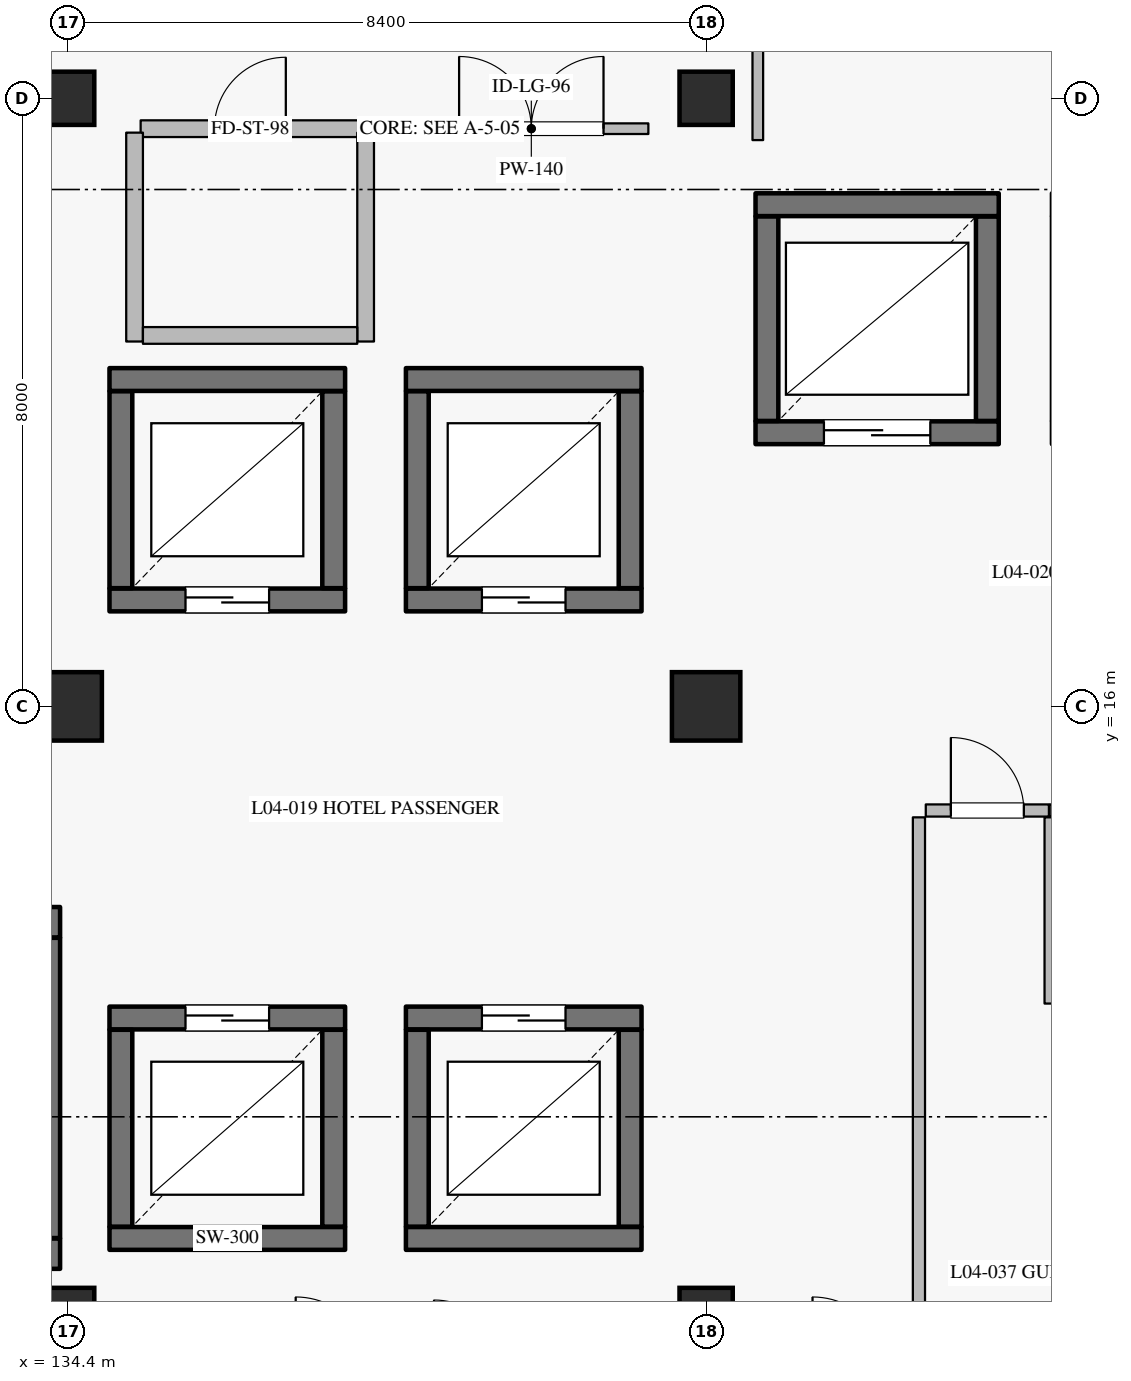
"""IFC4 building model, lengths in metres.
Left out: names, types, materials, properties, quantities, classifications, styles, units other than length and angle.
Written with IfcOpenShell. Run it as: python <this file> out.ifc"""

import sys

from ifc_helpers import new_model, si_unit, direction, frame, frame_2d, origin, origin_2d, place, context, subcontext, project, spatial, rectangle, extrude, element, fill, save


model = new_model("IFC4")
c1 = context("Model", 3, precision=1e-05, world=origin(), true_north=direction((0.0, 1.0)))
c2 = subcontext(c1, "Body", "Model", "MODEL_VIEW")
j1 = project(units=[si_unit("LENGTHUNIT", "METRE"), si_unit("PLANEANGLEUNIT", "RADIAN")], contexts=[c1])
p1 = place(None, origin())
s1 = spatial("IfcSite", under=j1, at=p1, CompositionType="ELEMENT")
p2 = place(p1, origin())
s2 = spatial("IfcBuilding", under=s1, at=p2, CompositionType="ELEMENT")
p3 = place(p2, frame((0.0, 0.0, 21.0)))
s3 = spatial("IfcBuildingStorey", under=s2, at=p3, CompositionType="ELEMENT", Elevation=21.0)
for number, where, z_axis, x_axis in (
    (1, (134.4, 16.0, 0.0), (0.0, 0.0, 1.0), (1.0, 0.0, 0.0)),
    (2, (142.8, 16.0, 0.0), (0.0, 0.0, 1.0), (1.0, 0.0, 0.0)),
):
    element("IfcColumn", number, at=place(p3, frame(where, z_axis=z_axis, x_axis=x_axis)), inside=s3, PredefinedType="COLUMN", context=c2, shape_type="SweptSolid", body=[
        extrude(rectangle(XDim=0.9, YDim=0.9, at=origin_2d()), origin(), (0.0, 0.0, 1.0), 4.2),
    ])
for number, where, z_axis, x_axis in (
    (3, (134.4, 8.0, 0.0), (0.0, 0.0, 1.0), (1.0, 0.0, 0.0)),
    (4, (134.4, 24.0, 0.0), (0.0, 0.0, 1.0), (1.0, 0.0, 0.0)),
    (5, (142.8, 8.0, 0.0), (0.0, 0.0, 1.0), (1.0, 0.0, 0.0)),
    (6, (142.8, 24.0, 0.0), (0.0, 0.0, 1.0), (1.0, 0.0, 0.0)),
):
    element("IfcColumn", number, at=place(p3, frame(where, z_axis=z_axis, x_axis=x_axis)), inside=s3, PredefinedType="COLUMN", context=c2, shape_type="SweptSolid", body=[
        extrude(rectangle(XDim=0.7, YDim=0.7, at=origin_2d()), origin(), (0.0, 0.0, 1.0), 4.2),
    ])
p4 = place(p3, frame((134.95, 17.4, 0.0), z_axis=(0.0, 0.0, 1.0), x_axis=(1.0, 0.0, 0.0)))
e7 = element("IfcWall", 7, at=p4, inside=s3, PredefinedType="SHEAR", context=c2, shape_type="SweptSolid", body=[
    extrude(rectangle(XDim=3.1, YDim=0.3, at=frame_2d((1.55, 0.0))), origin(), (0.0, 0.0, 1.0), 3.965),
])
p5 = place(p4, frame((1.0, 0.0, 0.0)))
e8 = element("IfcOpeningElement", 8, at=p5, cuts=e7, PredefinedType="OPENING", context=c2, shape_type="SweptSolid", body=[
    extrude(rectangle(XDim=1.1, YDim=2.2, at=frame_2d((0.55, 1.1))), frame((0.0, 0.16, 0.0), z_axis=(0.0, -1.0, 0.0), x_axis=(1.0, 0.0, 0.0)), (0.0, 0.0, 1.0), 0.32),
])
p6 = place(p3, frame((137.9, 17.555, 0.0), z_axis=(0.0, 0.0, 1.0), x_axis=(0.0, 1.0, 0.0)))
e9 = element("IfcWall", 9, at=p6, inside=s3, PredefinedType="SHEAR", context=c2, shape_type="SweptSolid", body=[
    extrude(rectangle(XDim=2.59, YDim=0.3, at=frame_2d((1.295, 0.0))), origin(), (0.0, 0.0, 1.0), 3.965),
])
p7 = place(p3, frame((138.05, 20.3, 0.0), z_axis=(0.0, 0.0, 1.0), x_axis=(-1.0, 0.0, 0.0)))
e10 = element("IfcWall", 10, at=p7, inside=s3, PredefinedType="SHEAR", context=c2, shape_type="SweptSolid", body=[
    extrude(rectangle(XDim=3.1, YDim=0.3, at=frame_2d((1.55, 0.0))), origin(), (0.0, 0.0, 1.0), 3.965),
])
p8 = place(p3, frame((135.1, 20.145, 0.0), z_axis=(0.0, 0.0, 1.0), x_axis=(0.0, -1.0, 0.0)))
e11 = element("IfcWall", 11, at=p8, inside=s3, PredefinedType="SHEAR", context=c2, shape_type="SweptSolid", body=[
    extrude(rectangle(XDim=2.59, YDim=0.3, at=frame_2d((1.295, 0.0))), origin(), (0.0, 0.0, 1.0), 3.965),
])
p9 = place(p3, frame((138.85, 17.4, 0.0), z_axis=(0.0, 0.0, 1.0), x_axis=(1.0, 0.0, 0.0)))
e12 = element("IfcWall", 12, at=p9, inside=s3, PredefinedType="SHEAR", context=c2, shape_type="SweptSolid", body=[
    extrude(rectangle(XDim=3.1, YDim=0.3, at=frame_2d((1.55, 0.0))), origin(), (0.0, 0.0, 1.0), 3.965),
])
p10 = place(p9, frame((1.0, 0.0, 0.0)))
e13 = element("IfcOpeningElement", 13, at=p10, cuts=e12, PredefinedType="OPENING", context=c2, shape_type="SweptSolid", body=[
    extrude(rectangle(XDim=1.1, YDim=2.2, at=frame_2d((0.55, 1.1))), frame((0.0, 0.16, 0.0), z_axis=(0.0, -1.0, 0.0), x_axis=(1.0, 0.0, 0.0)), (0.0, 0.0, 1.0), 0.32),
])
p11 = place(p3, frame((141.8, 17.555, 0.0), z_axis=(0.0, 0.0, 1.0), x_axis=(0.0, 1.0, 0.0)))
e14 = element("IfcWall", 14, at=p11, inside=s3, PredefinedType="SHEAR", context=c2, shape_type="SweptSolid", body=[
    extrude(rectangle(XDim=2.59, YDim=0.3, at=frame_2d((1.295, 0.0))), origin(), (0.0, 0.0, 1.0), 3.965),
])
p12 = place(p3, frame((141.95, 20.3, 0.0), z_axis=(0.0, 0.0, 1.0), x_axis=(-1.0, 0.0, 0.0)))
e15 = element("IfcWall", 15, at=p12, inside=s3, PredefinedType="SHEAR", context=c2, shape_type="SweptSolid", body=[
    extrude(rectangle(XDim=3.1, YDim=0.3, at=frame_2d((1.55, 0.0))), origin(), (0.0, 0.0, 1.0), 3.965),
])
p13 = place(p3, frame((139.0, 20.145, 0.0), z_axis=(0.0, 0.0, 1.0), x_axis=(0.0, -1.0, 0.0)))
e16 = element("IfcWall", 16, at=p13, inside=s3, PredefinedType="SHEAR", context=c2, shape_type="SweptSolid", body=[
    extrude(rectangle(XDim=2.59, YDim=0.3, at=frame_2d((1.295, 0.0))), origin(), (0.0, 0.0, 1.0), 3.965),
])
p14 = place(p3, frame((134.95, 9.0, 0.0), z_axis=(0.0, 0.0, 1.0), x_axis=(1.0, 0.0, 0.0)))
e17 = element("IfcWall", 17, at=p14, inside=s3, PredefinedType="SHEAR", context=c2, shape_type="SweptSolid", body=[
    extrude(rectangle(XDim=3.1, YDim=0.3, at=frame_2d((1.55, 0.0))), origin(), (0.0, 0.0, 1.0), 3.965),
])
p15 = place(p3, frame((137.9, 9.155, 0.0), z_axis=(0.0, 0.0, 1.0), x_axis=(0.0, 1.0, 0.0)))
e18 = element("IfcWall", 18, at=p15, inside=s3, PredefinedType="SHEAR", context=c2, shape_type="SweptSolid", body=[
    extrude(rectangle(XDim=2.59, YDim=0.3, at=frame_2d((1.295, 0.0))), origin(), (0.0, 0.0, 1.0), 3.965),
])
p16 = place(p3, frame((138.05, 11.9, 0.0), z_axis=(0.0, 0.0, 1.0), x_axis=(-1.0, 0.0, 0.0)))
e19 = element("IfcWall", 19, at=p16, inside=s3, PredefinedType="SHEAR", context=c2, shape_type="SweptSolid", body=[
    extrude(rectangle(XDim=3.1, YDim=0.3, at=frame_2d((1.55, 0.0))), origin(), (0.0, 0.0, 1.0), 3.965),
])
p17 = place(p16, frame((1.0, 0.0, 0.0)))
e20 = element("IfcOpeningElement", 20, at=p17, cuts=e19, PredefinedType="OPENING", context=c2, shape_type="SweptSolid", body=[
    extrude(rectangle(XDim=1.1, YDim=2.2, at=frame_2d((0.55, 1.1))), frame((0.0, 0.16, 0.0), z_axis=(0.0, -1.0, 0.0), x_axis=(1.0, 0.0, 0.0)), (0.0, 0.0, 1.0), 0.32),
])
p18 = place(p3, frame((135.1, 11.745, 0.0), z_axis=(0.0, 0.0, 1.0), x_axis=(0.0, -1.0, 0.0)))
e21 = element("IfcWall", 21, at=p18, inside=s3, PredefinedType="SHEAR", context=c2, shape_type="SweptSolid", body=[
    extrude(rectangle(XDim=2.59, YDim=0.3, at=frame_2d((1.295, 0.0))), origin(), (0.0, 0.0, 1.0), 3.965),
])
p19 = place(p3, frame((138.85, 9.0, 0.0), z_axis=(0.0, 0.0, 1.0), x_axis=(1.0, 0.0, 0.0)))
e22 = element("IfcWall", 22, at=p19, inside=s3, PredefinedType="SHEAR", context=c2, shape_type="SweptSolid", body=[
    extrude(rectangle(XDim=3.1, YDim=0.3, at=frame_2d((1.55, 0.0))), origin(), (0.0, 0.0, 1.0), 3.965),
])
p20 = place(p3, frame((141.8, 9.155, 0.0), z_axis=(0.0, 0.0, 1.0), x_axis=(0.0, 1.0, 0.0)))
e23 = element("IfcWall", 23, at=p20, inside=s3, PredefinedType="SHEAR", context=c2, shape_type="SweptSolid", body=[
    extrude(rectangle(XDim=2.59, YDim=0.3, at=frame_2d((1.295, 0.0))), origin(), (0.0, 0.0, 1.0), 3.965),
])
p21 = place(p3, frame((141.95, 11.9, 0.0), z_axis=(0.0, 0.0, 1.0), x_axis=(-1.0, 0.0, 0.0)))
e24 = element("IfcWall", 24, at=p21, inside=s3, PredefinedType="SHEAR", context=c2, shape_type="SweptSolid", body=[
    extrude(rectangle(XDim=3.1, YDim=0.3, at=frame_2d((1.55, 0.0))), origin(), (0.0, 0.0, 1.0), 3.965),
])
p22 = place(p21, frame((1.0, 0.0, 0.0)))
e25 = element("IfcOpeningElement", 25, at=p22, cuts=e24, PredefinedType="OPENING", context=c2, shape_type="SweptSolid", body=[
    extrude(rectangle(XDim=1.1, YDim=2.2, at=frame_2d((0.55, 1.1))), frame((0.0, 0.16, 0.0), z_axis=(0.0, -1.0, 0.0), x_axis=(1.0, 0.0, 0.0)), (0.0, 0.0, 1.0), 0.32),
])
p23 = place(p3, frame((139.0, 11.745, 0.0), z_axis=(0.0, 0.0, 1.0), x_axis=(0.0, -1.0, 0.0)))
e26 = element("IfcWall", 26, at=p23, inside=s3, PredefinedType="SHEAR", context=c2, shape_type="SweptSolid", body=[
    extrude(rectangle(XDim=2.59, YDim=0.3, at=frame_2d((1.295, 0.0))), origin(), (0.0, 0.0, 1.0), 3.965),
])
p24 = place(p3, frame((143.45, 19.6, 0.0), z_axis=(0.0, 0.0, 1.0), x_axis=(1.0, 0.0, 0.0)))
e27 = element("IfcWall", 27, at=p24, inside=s3, PredefinedType="SHEAR", context=c2, shape_type="SweptSolid", body=[
    extrude(rectangle(XDim=3.2, YDim=0.3, at=frame_2d((1.6, 0.0))), origin(), (0.0, 0.0, 1.0), 3.965),
])
p25 = place(p24, frame((0.9, 0.0, 0.0)))
e28 = element("IfcOpeningElement", 28, at=p25, cuts=e27, PredefinedType="OPENING", context=c2, shape_type="SweptSolid", body=[
    extrude(rectangle(XDim=1.4, YDim=2.35, at=frame_2d((0.7, 1.175))), frame((0.0, 0.16, 0.0), z_axis=(0.0, -1.0, 0.0), x_axis=(1.0, 0.0, 0.0)), (0.0, 0.0, 1.0), 0.32),
])
p26 = place(p3, frame((146.5, 19.755, 0.0), z_axis=(0.0, 0.0, 1.0), x_axis=(0.0, 1.0, 0.0)))
e29 = element("IfcWall", 29, at=p26, inside=s3, PredefinedType="SHEAR", context=c2, shape_type="SweptSolid", body=[
    extrude(rectangle(XDim=2.69, YDim=0.3, at=frame_2d((1.345, 0.0))), origin(), (0.0, 0.0, 1.0), 3.965),
])
p27 = place(p3, frame((146.65, 22.6, 0.0), z_axis=(0.0, 0.0, 1.0), x_axis=(-1.0, 0.0, 0.0)))
e30 = element("IfcWall", 30, at=p27, inside=s3, PredefinedType="SHEAR", context=c2, shape_type="SweptSolid", body=[
    extrude(rectangle(XDim=3.2, YDim=0.3, at=frame_2d((1.6, 0.0))), origin(), (0.0, 0.0, 1.0), 3.965),
])
p28 = place(p3, frame((143.6, 22.445, 0.0), z_axis=(0.0, 0.0, 1.0), x_axis=(0.0, -1.0, 0.0)))
e31 = element("IfcWall", 31, at=p28, inside=s3, PredefinedType="SHEAR", context=c2, shape_type="SweptSolid", body=[
    extrude(rectangle(XDim=2.69, YDim=0.3, at=frame_2d((1.345, 0.0))), origin(), (0.0, 0.0, 1.0), 3.965),
])
p29 = place(p3, frame((126.1, 8.8, 0.0), z_axis=(0.0, 0.0, 1.0), x_axis=(1.0, 0.0, 0.0)))
e32 = element("IfcWall", 32, at=p29, inside=s3, PredefinedType="SHEAR", context=c2, shape_type="SweptSolid", body=[
    extrude(rectangle(XDim=8.2, YDim=0.4, at=frame_2d((4.1, 0.0))), origin(), (0.0, 0.0, 1.0), 3.965),
])
p30 = place(p3, frame((134.1, 9.005, 0.0), z_axis=(0.0, 0.0, 1.0), x_axis=(0.0, 1.0, 0.0)))
e33 = element("IfcWall", 33, at=p30, inside=s3, PredefinedType="SHEAR", context=c2, shape_type="SweptSolid", body=[
    extrude(rectangle(XDim=3.95, YDim=0.4, at=frame_2d((1.975, 0.0))), origin(), (0.0, 0.0, 1.0), 3.965),
])
p31 = place(p3, frame((126.1, 13.16, 0.0), z_axis=(0.0, 0.0, 1.0), x_axis=(1.0, 0.0, 0.0)))
e34 = element("IfcWall", 34, at=p31, inside=s3, PredefinedType="SHEAR", context=c2, shape_type="SweptSolid", body=[
    extrude(rectangle(XDim=8.2, YDim=0.4, at=frame_2d((4.1, 0.0))), origin(), (0.0, 0.0, 1.0), 3.965),
])
p32 = place(p31, frame((0.43, 0.0, 0.0)))
e35 = element("IfcOpeningElement", 35, at=p32, cuts=e34, PredefinedType="OPENING", context=c2, shape_type="SweptSolid", body=[
    extrude(rectangle(XDim=1.16, YDim=2.2, at=frame_2d((0.58, 1.1))), frame((0.0, 0.21, 0.0), z_axis=(0.0, -1.0, 0.0), x_axis=(1.0, 0.0, 0.0)), (0.0, 0.0, 1.0), 0.42),
])
p33 = place(p3, frame((145.69, 14.63, 0.0), z_axis=(0.0, 0.0, 1.0), x_axis=(1.0, 0.0, 0.0)))
e36 = element("IfcWall", 36, at=p33, inside=s3, PredefinedType="PARTITIONING", context=c2, shape_type="SweptSolid", body=[
    extrude(rectangle(XDim=1.62, YDim=0.16, at=frame_2d((0.81, 0.0))), origin(), (0.0, 0.0, 1.0), 3.965),
])
p34 = place(p33, frame((0.33, 0.0, 0.0)))
e37 = element("IfcOpeningElement", 37, at=p34, cuts=e36, PredefinedType="OPENING", context=c2, shape_type="SweptSolid", body=[
    extrude(rectangle(XDim=0.96, YDim=2.2, at=frame_2d((0.48, 1.1))), frame((0.0, 0.09, 0.0), z_axis=(0.0, -1.0, 0.0), x_axis=(1.0, 0.0, 0.0)), (0.0, 0.0, 1.0), 0.18),
])
p35 = place(p3, frame((147.32, 14.63, 0.0), z_axis=(0.0, 0.0, 1.0), x_axis=(1.0, 0.0, 0.0)))
e38 = element("IfcWall", 38, at=p35, inside=s3, PredefinedType="PARTITIONING", context=c2, shape_type="SweptSolid", body=[
    extrude(rectangle(XDim=1.59, YDim=0.16, at=frame_2d((0.795, 0.0))), origin(), (0.0, 0.0, 1.0), 3.965),
])
p36 = place(p3, frame((147.31, 12.09, 0.0), z_axis=(0.0, 0.0, 1.0), x_axis=(0.0, 1.0, 0.0)))
e39 = element("IfcWall", 39, at=p36, inside=s3, PredefinedType="PARTITIONING", context=c2, shape_type="SweptSolid", body=[
    extrude(rectangle(XDim=2.45, YDim=0.115, at=frame_2d((1.225, 0.0))), origin(), (0.0, 0.0, 1.0), 3.965),
])
p37 = place(p3, frame((145.6, 6.24, 0.0), z_axis=(0.0, 0.0, 1.0), x_axis=(0.0, 1.0, 0.0)))
e40 = element("IfcWall", 40, at=p37, inside=s3, PredefinedType="PARTITIONING", context=c2, shape_type="SweptSolid", body=[
    extrude(rectangle(XDim=8.3, YDim=0.16, at=frame_2d((4.15, 0.0))), origin(), (0.0, 0.0, 1.0), 3.965),
])
p38 = place(p3, frame((138.96, 23.6, 0.0), z_axis=(0.0, 0.0, 1.0), x_axis=(1.0, 0.0, 0.0)))
e41 = element("IfcWall", 41, at=p38, inside=s3, PredefinedType="PARTITIONING", context=c2, shape_type="SweptSolid", body=[
    extrude(rectangle(XDim=3.08, YDim=0.14, at=frame_2d((1.54, 0.0))), origin(), (0.0, 0.0, 1.0), 3.965),
])
p39 = place(p38, frame((0.59, 0.0, 0.0)))
e42 = element("IfcOpeningElement", 42, at=p39, cuts=e41, PredefinedType="OPENING", context=c2, shape_type="SweptSolid", body=[
    extrude(rectangle(XDim=1.9, YDim=2.4, at=frame_2d((0.95, 1.2))), frame((0.0, 0.08, 0.0), z_axis=(0.0, -1.0, 0.0), x_axis=(1.0, 0.0, 0.0)), (0.0, 0.0, 1.0), 0.16),
])
p40 = place(p3, frame((135.36, 23.6, 0.0), z_axis=(0.0, 0.0, 1.0), x_axis=(1.0, 0.0, 0.0)))
e43 = element("IfcWall", 43, at=p40, inside=s3, PredefinedType="PARTITIONING", context=c2, shape_type="SweptSolid", body=[
    extrude(rectangle(XDim=2.88, YDim=0.22, at=frame_2d((1.44, 0.0))), origin(), (0.0, 0.0, 1.0), 3.965),
])
p41 = place(p40, frame((0.97, 0.0, 0.0)))
e44 = element("IfcOpeningElement", 44, at=p41, cuts=e43, PredefinedType="OPENING", context=c2, shape_type="SweptSolid", body=[
    extrude(rectangle(XDim=0.94, YDim=2.15, at=frame_2d((0.47, 1.075))), frame((0.0, 0.12, 0.0), z_axis=(0.0, -1.0, 0.0), x_axis=(1.0, 0.0, 0.0)), (0.0, 0.0, 1.0), 0.24),
])
p42 = place(p3, frame((143.48, 23.45, 0.0), z_axis=(0.0, 0.0, 1.0), x_axis=(0.0, 1.0, 0.0)))
e45 = element("IfcWall", 45, at=p42, inside=s3, PredefinedType="PARTITIONING", context=c2, shape_type="SweptSolid", body=[
    extrude(rectangle(XDim=3.21, YDim=0.14, at=frame_2d((1.605, 0.0))), origin(), (0.0, 0.0, 1.0), 3.965),
])
for number, where, z_axis, x_axis in (
    (46, (135.28, 20.8, 0.0), (0.0, 0.0, 1.0), (0.0, 1.0, 0.0)),
    (47, (138.32, 20.8, 0.0), (0.0, 0.0, 1.0), (0.0, 1.0, 0.0)),
):
    element("IfcWall", number, at=place(p3, frame(where, z_axis=z_axis, x_axis=x_axis)), inside=s3, PredefinedType="PARTITIONING", context=c2, shape_type="SweptSolid", body=[
        extrude(rectangle(XDim=2.748, YDim=0.22, at=frame_2d((1.374, 0.0))), origin(), (0.0, 0.0, 1.0), 3.965),
    ])
p43 = place(p3, frame((135.39, 20.88, 0.0), z_axis=(0.0, 0.0, 1.0), x_axis=(1.0, 0.0, 0.0)))
e48 = element("IfcWall", 48, at=p43, inside=s3, PredefinedType="PARTITIONING", context=c2, shape_type="SweptSolid", body=[
    extrude(rectangle(XDim=2.82, YDim=0.22, at=frame_2d((1.41, 0.0))), origin(), (0.0, 0.0, 1.0), 3.965),
])
p44 = place(p5, origin())
e49 = element("IfcDoor", 49, at=p44, inside=s3, OperationType="DOUBLE_DOOR_SLIDING", PredefinedType="DOOR", context=c2, shape_type="SweptSolid", body=[
    extrude(rectangle(XDim=1.1, YDim=2.2, at=frame_2d((0.55, 1.1))), frame((0.0, 0.025, 0.0), z_axis=(0.0, -1.0, 0.0), x_axis=(1.0, 0.0, 0.0)), (0.0, 0.0, 1.0), 0.05),
])
fill(e8, e49)
p45 = place(p10, origin())
e50 = element("IfcDoor", 50, at=p45, inside=s3, OperationType="DOUBLE_DOOR_SLIDING", PredefinedType="DOOR", context=c2, shape_type="SweptSolid", body=[
    extrude(rectangle(XDim=1.1, YDim=2.2, at=frame_2d((0.55, 1.1))), frame((0.0, 0.025, 0.0), z_axis=(0.0, -1.0, 0.0), x_axis=(1.0, 0.0, 0.0)), (0.0, 0.0, 1.0), 0.05),
])
fill(e13, e50)
p46 = place(p17, origin())
e51 = element("IfcDoor", 51, at=p46, inside=s3, OperationType="DOUBLE_DOOR_SLIDING", PredefinedType="DOOR", context=c2, shape_type="SweptSolid", body=[
    extrude(rectangle(XDim=1.1, YDim=2.2, at=frame_2d((0.55, 1.1))), frame((0.0, 0.025, 0.0), z_axis=(0.0, -1.0, 0.0), x_axis=(1.0, 0.0, 0.0)), (0.0, 0.0, 1.0), 0.05),
])
fill(e20, e51)
p47 = place(p22, origin())
e52 = element("IfcDoor", 52, at=p47, inside=s3, OperationType="DOUBLE_DOOR_SLIDING", PredefinedType="DOOR", context=c2, shape_type="SweptSolid", body=[
    extrude(rectangle(XDim=1.1, YDim=2.2, at=frame_2d((0.55, 1.1))), frame((0.0, 0.025, 0.0), z_axis=(0.0, -1.0, 0.0), x_axis=(1.0, 0.0, 0.0)), (0.0, 0.0, 1.0), 0.05),
])
fill(e25, e52)
p48 = place(p25, origin())
e53 = element("IfcDoor", 53, at=p48, inside=s3, OperationType="DOUBLE_DOOR_SLIDING", PredefinedType="DOOR", context=c2, shape_type="SweptSolid", body=[
    extrude(rectangle(XDim=1.4, YDim=2.35, at=frame_2d((0.7, 1.175))), frame((0.0, 0.025, 0.0), z_axis=(0.0, -1.0, 0.0), x_axis=(1.0, 0.0, 0.0)), (0.0, 0.0, 1.0), 0.05),
])
fill(e28, e53)
p49 = place(p34, origin())
e54 = element("IfcDoor", 54, at=p49, inside=s3, OperationType="SINGLE_SWING_LEFT", PredefinedType="DOOR", context=c2, shape_type="SweptSolid", body=[
    extrude(rectangle(XDim=0.96, YDim=2.2, at=frame_2d((0.48, 1.1))), frame((0.0, 0.025, 0.0), z_axis=(0.0, -1.0, 0.0), x_axis=(1.0, 0.0, 0.0)), (0.0, 0.0, 1.0), 0.05),
])
fill(e37, e54)
p50 = place(p39, origin())
e55 = element("IfcDoor", 55, at=p50, inside=s3, OperationType="DOUBLE_DOOR_SINGLE_SWING", PredefinedType="DOOR", context=c2, shape_type="SweptSolid", body=[
    extrude(rectangle(XDim=1.9, YDim=2.4, at=frame_2d((0.95, 1.2))), frame((0.0, 0.025, 0.0), z_axis=(0.0, -1.0, 0.0), x_axis=(1.0, 0.0, 0.0)), (0.0, 0.0, 1.0), 0.05),
])
fill(e42, e55)
p51 = place(p41, origin())
e56 = element("IfcDoor", 56, at=p51, inside=s3, OperationType="SINGLE_SWING_RIGHT", PredefinedType="DOOR", context=c2, shape_type="SweptSolid", body=[
    extrude(rectangle(XDim=0.94, YDim=2.15, at=frame_2d((0.47, 1.075))), frame((0.0, 0.025, 0.0), z_axis=(0.0, -1.0, 0.0), x_axis=(1.0, 0.0, 0.0)), (0.0, 0.0, 1.0), 0.05),
])
fill(e44, e56)
save(model, sys.argv[1])
